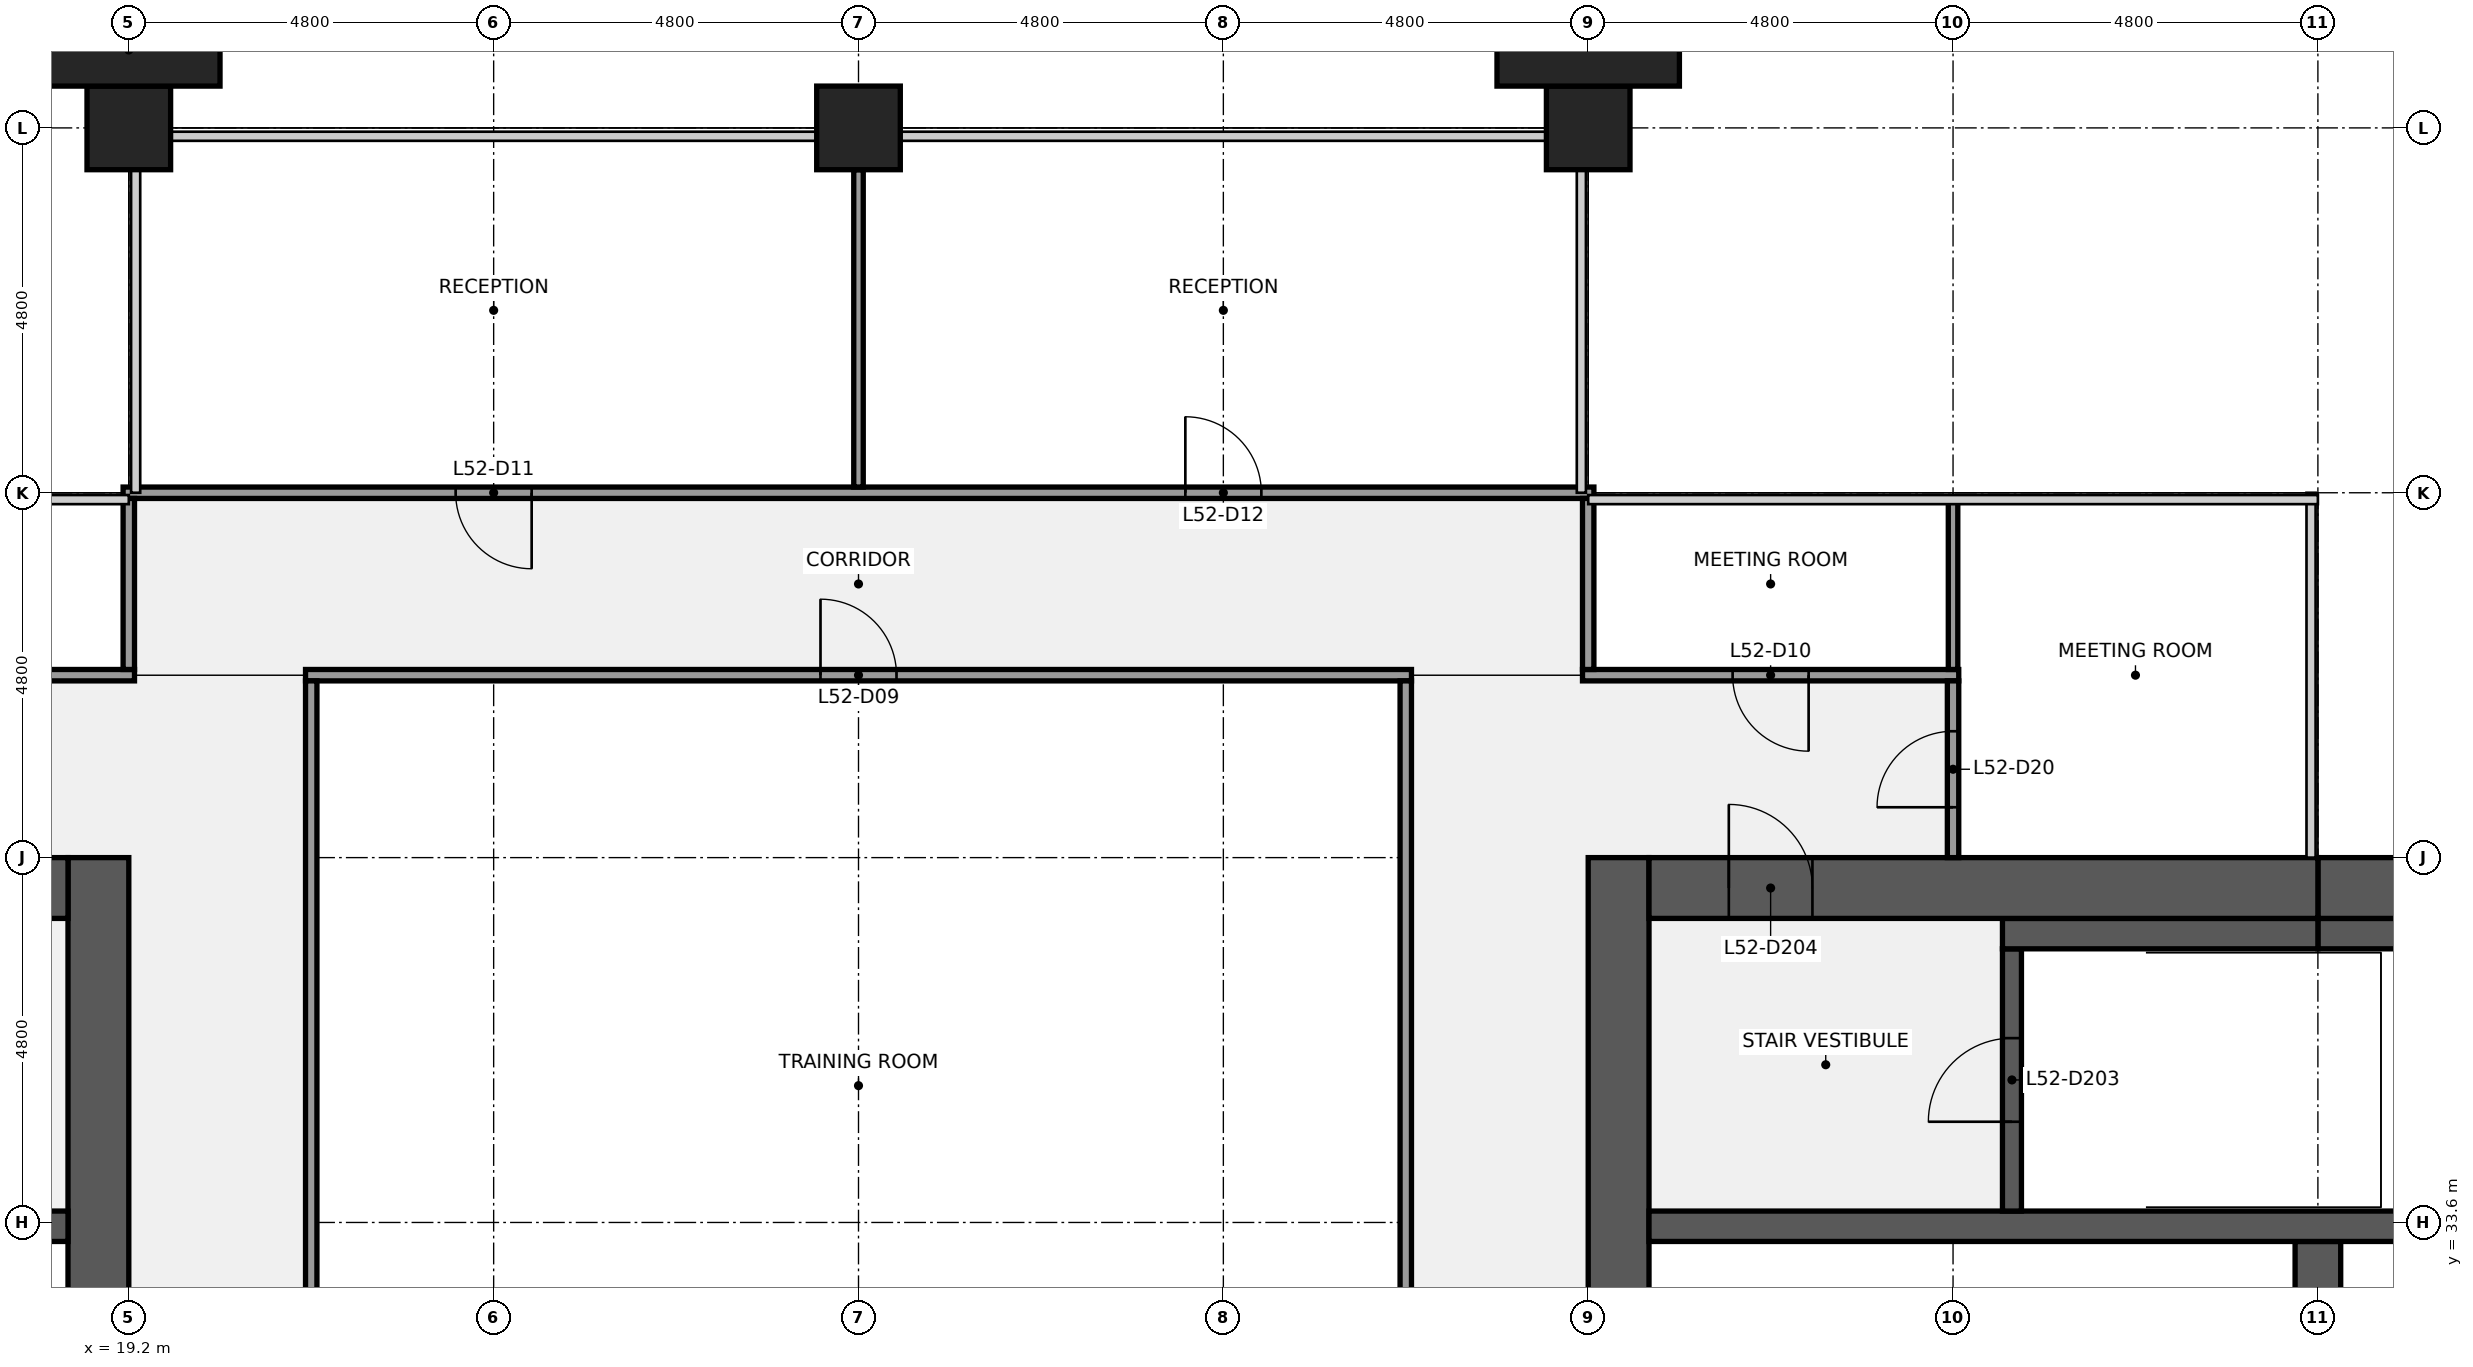
"""IFC4 building model, lengths in metres.
Left out: names, types, materials, properties, quantities, classifications, styles, units other than length and angle.
Written with IfcOpenShell. Run it as: python <this file> out.ifc"""

import sys

from ifc_helpers import new_model, si_unit, direction, frame, frame_2d, origin, origin_2d, place, context, subcontext, project, spatial, rectangle, extrude, element, fill, save


model = new_model("IFC4")
c1 = context("Model", 3, precision=1e-05, world=origin(), true_north=direction((0.0, 1.0)))
c2 = subcontext(c1, "Body", "Model", "MODEL_VIEW")
j1 = project(units=[si_unit("LENGTHUNIT", "METRE"), si_unit("PLANEANGLEUNIT", "RADIAN")], contexts=[c1])
p1 = place(None, origin())
s1 = spatial("IfcSite", under=j1, at=p1, CompositionType="ELEMENT")
p2 = place(p1, origin())
s2 = spatial("IfcBuilding", under=s1, at=p2, CompositionType="ELEMENT")
p3 = place(p2, frame((0.0, 0.0, 237.2)))
s3 = spatial("IfcBuildingStorey", under=s2, at=p3, CompositionType="ELEMENT", Elevation=237.2)
for number, where, z_axis, x_axis in (
    (1, (19.2, 48.0, 0.0), (0.0, 0.0, 1.0), (1.0, 0.0, 0.0)),
    (2, (28.8, 48.0, 0.0), (0.0, 0.0, 1.0), (1.0, 0.0, 0.0)),
    (3, (38.4, 48.0, 0.0), (0.0, 0.0, 1.0), (1.0, 0.0, 0.0)),
):
    element("IfcColumn", number, at=place(p3, frame(where, z_axis=z_axis, x_axis=x_axis)), inside=s3, PredefinedType="COLUMN", context=c2, shape_type="SweptSolid", body=[
        extrude(rectangle(XDim=1.1, YDim=1.1, at=origin_2d()), origin(), (0.0, 0.0, 1.0), 4.0),
    ])
p4 = place(p3, frame((18.8, 38.4, 0.0), z_axis=(0.0, 0.0, 1.0), x_axis=(0.0, -1.0, 0.0)))
e4 = element("IfcWall", 4, at=p4, inside=s3, PredefinedType="SHEAR", context=c2, shape_type="SweptSolid", body=[
    extrude(rectangle(XDim=28.8, YDim=0.8, at=frame_2d((14.4, 0.0))), origin(), (0.0, 0.0, 1.0), 3.84),
])
p5 = place(p4, frame((18.3, 0.0, 0.0)))
e5 = element("IfcOpeningElement", 5, at=p5, cuts=e4, PredefinedType="OPENING", context=c2, shape_type="SweptSolid", body=[
    extrude(rectangle(XDim=1.8, YDim=2.1, at=frame_2d((0.9, 1.05))), frame((0.0, 0.41, 0.0), z_axis=(0.0, -1.0, 0.0), x_axis=(1.0, 0.0, 0.0)), (0.0, 0.0, 1.0), 0.82),
])
p6 = place(p4, frame((8.7, 0.0, 0.0)))
e6 = element("IfcOpeningElement", 6, at=p6, cuts=e4, PredefinedType="OPENING", context=c2, shape_type="SweptSolid", body=[
    extrude(rectangle(XDim=1.8, YDim=2.1, at=frame_2d((0.9, 1.05))), frame((0.0, 0.41, 0.0), z_axis=(0.0, -1.0, 0.0), x_axis=(1.0, 0.0, 0.0)), (0.0, 0.0, 1.0), 0.82),
])
p7 = place(p3, frame((0.8, 33.55, 0.0), z_axis=(0.0, 0.0, 1.0), x_axis=(1.0, 0.0, 0.0)))
e7 = element("IfcWall", 7, at=p7, inside=s3, PredefinedType="SHEAR", context=c2, shape_type="SweptSolid", body=[
    extrude(rectangle(XDim=17.6, YDim=0.4, at=frame_2d((8.8, 0.0))), origin(), (0.0, 0.0, 1.0), 3.84),
])
p8 = place(p3, frame((9.6, 38.0, 0.0), z_axis=(0.0, 0.0, 1.0), x_axis=(1.0, 0.0, 0.0)))
e8 = element("IfcWall", 8, at=p8, inside=s3, PredefinedType="SHEAR", context=c2, shape_type="SweptSolid", body=[
    extrude(rectangle(XDim=8.8, YDim=0.8, at=frame_2d((4.4, 0.0))), origin(), (0.0, 0.0, 1.0), 3.84),
])
p9 = place(p8, frame((6.65, 0.0, 0.0)))
e9 = element("IfcOpeningElement", 9, at=p9, cuts=e8, PredefinedType="OPENING", context=c2, shape_type="SweptSolid", body=[
    extrude(rectangle(XDim=1.1, YDim=2.1, at=frame_2d((0.55, 1.05))), frame((0.0, 0.41, 0.0), z_axis=(0.0, -1.0, 0.0), x_axis=(1.0, 0.0, 0.0)), (0.0, 0.0, 1.0), 0.82),
])
p10 = place(p3, frame((38.8, 9.6, 0.0), z_axis=(0.0, 0.0, 1.0), x_axis=(0.0, 1.0, 0.0)))
e10 = element("IfcWall", 10, at=p10, inside=s3, PredefinedType="SHEAR", context=c2, shape_type="SweptSolid", body=[
    extrude(rectangle(XDim=28.8, YDim=0.8, at=frame_2d((14.4, 0.0))), origin(), (0.0, 0.0, 1.0), 3.84),
])
p11 = place(p10, frame((8.7, 0.0, 0.0)))
e11 = element("IfcOpeningElement", 11, at=p11, cuts=e10, PredefinedType="OPENING", context=c2, shape_type="SweptSolid", body=[
    extrude(rectangle(XDim=1.8, YDim=2.1, at=frame_2d((0.9, 1.05))), frame((0.0, 0.41, 0.0), z_axis=(0.0, -1.0, 0.0), x_axis=(1.0, 0.0, 0.0)), (0.0, 0.0, 1.0), 0.82),
])
p12 = place(p10, frame((18.3, 0.0, 0.0)))
e12 = element("IfcOpeningElement", 12, at=p12, cuts=e10, PredefinedType="OPENING", context=c2, shape_type="SweptSolid", body=[
    extrude(rectangle(XDim=1.8, YDim=2.1, at=frame_2d((0.9, 1.05))), frame((0.0, 0.41, 0.0), z_axis=(0.0, -1.0, 0.0), x_axis=(1.0, 0.0, 0.0)), (0.0, 0.0, 1.0), 0.82),
])
p13 = place(p3, frame((48.0, 30.75, 0.0), z_axis=(0.0, 0.0, 1.0), x_axis=(0.0, 1.0, 0.0)))
e13 = element("IfcWall", 13, at=p13, inside=s3, PredefinedType="SHEAR", context=c2, shape_type="SweptSolid", body=[
    extrude(rectangle(XDim=2.6, YDim=0.6, at=frame_2d((1.3, 0.0))), origin(), (0.0, 0.0, 1.0), 3.84),
])
p14 = place(p3, frame((39.2, 33.55, 0.0), z_axis=(0.0, 0.0, 1.0), x_axis=(1.0, 0.0, 0.0)))
e14 = element("IfcWall", 14, at=p14, inside=s3, PredefinedType="SHEAR", context=c2, shape_type="SweptSolid", body=[
    extrude(rectangle(XDim=17.6, YDim=0.4, at=frame_2d((8.8, 0.0))), origin(), (0.0, 0.0, 1.0), 3.84),
])
p15 = place(p3, frame((43.975, 33.75, 0.0), z_axis=(0.0, 0.0, 1.0), x_axis=(0.0, 1.0, 0.0)))
e15 = element("IfcWall", 15, at=p15, inside=s3, PredefinedType="SHEAR", context=c2, shape_type="SweptSolid", body=[
    extrude(rectangle(XDim=3.45, YDim=0.25, at=frame_2d((1.725, 0.0))), origin(), (0.0, 0.0, 1.0), 3.84),
])
p16 = place(p15, frame((1.175, 0.0, 0.0)))
e16 = element("IfcOpeningElement", 16, at=p16, cuts=e15, PredefinedType="OPENING", context=c2, shape_type="SweptSolid", body=[
    extrude(rectangle(XDim=1.1, YDim=2.1, at=frame_2d((0.55, 1.05))), frame((0.0, 0.135, 0.0), z_axis=(0.0, -1.0, 0.0), x_axis=(1.0, 0.0, 0.0)), (0.0, 0.0, 1.0), 0.27),
])
p17 = place(p3, frame((48.0, 37.4, 0.0), z_axis=(0.0, 0.0, 1.0), x_axis=(1.0, 0.0, 0.0)))
e17 = element("IfcWall", 17, at=p17, inside=s3, PredefinedType="SHEAR", context=c2, shape_type="SweptSolid", body=[
    extrude(rectangle(XDim=3.35, YDim=0.4, at=frame_2d((1.675, 0.0))), origin(), (0.0, 0.0, 1.0), 3.84),
])
p18 = place(p3, frame((43.85, 37.4, 0.0), z_axis=(0.0, 0.0, 1.0), x_axis=(1.0, 0.0, 0.0)))
e18 = element("IfcWall", 18, at=p18, inside=s3, PredefinedType="SHEAR", context=c2, shape_type="SweptSolid", body=[
    extrude(rectangle(XDim=4.15, YDim=0.4, at=frame_2d((2.075, 0.0))), origin(), (0.0, 0.0, 1.0), 3.84),
])
p19 = place(p3, frame((48.0, 38.0, 0.0), z_axis=(0.0, 0.0, 1.0), x_axis=(1.0, 0.0, 0.0)))
e19 = element("IfcWall", 19, at=p19, inside=s3, PredefinedType="SHEAR", context=c2, shape_type="SweptSolid", body=[
    extrude(rectangle(XDim=8.8, YDim=0.8, at=frame_2d((4.4, 0.0))), origin(), (0.0, 0.0, 1.0), 3.84),
])
p20 = place(p19, frame((1.5, 0.0, 0.9)))
e20 = element("IfcOpeningElement", 20, at=p20, cuts=e19, PredefinedType="OPENING", context=c2, shape_type="SweptSolid", body=[
    extrude(rectangle(XDim=1.8, YDim=1.5, at=frame_2d((0.9, 0.75))), frame((0.0, 0.41, 0.0), z_axis=(0.0, -1.0, 0.0), x_axis=(1.0, 0.0, 0.0)), (0.0, 0.0, 1.0), 0.82),
])
p21 = place(p3, frame((39.2, 38.0, 0.0), z_axis=(0.0, 0.0, 1.0), x_axis=(1.0, 0.0, 0.0)))
e21 = element("IfcWall", 21, at=p21, inside=s3, PredefinedType="SHEAR", context=c2, shape_type="SweptSolid", body=[
    extrude(rectangle(XDim=8.8, YDim=0.8, at=frame_2d((4.4, 0.0))), origin(), (0.0, 0.0, 1.0), 3.84),
])
p22 = place(p21, frame((1.05, 0.0, 0.0)))
e22 = element("IfcOpeningElement", 22, at=p22, cuts=e21, PredefinedType="OPENING", context=c2, shape_type="SweptSolid", body=[
    extrude(rectangle(XDim=1.1, YDim=2.1, at=frame_2d((0.55, 1.05))), frame((0.0, 0.41, 0.0), z_axis=(0.0, -1.0, 0.0), x_axis=(1.0, 0.0, 0.0)), (0.0, 0.0, 1.0), 0.82),
])
p23 = place(p3, frame((14.325, 40.8, 0.0), z_axis=(0.0, 0.0, 1.0), x_axis=(1.0, 0.0, 0.0)))
e23 = element("IfcWall", 23, at=p23, inside=s3, PredefinedType="PARTITIONING", context=c2, shape_type="SweptSolid", body=[
    extrude(rectangle(XDim=4.95, YDim=0.15, at=frame_2d((2.475, 0.0))), origin(), (0.0, 0.0, 1.0), 2.87),
])
p24 = place(p23, frame((1.975, 0.0, 0.0)))
e24 = element("IfcOpeningElement", 24, at=p24, cuts=e23, PredefinedType="OPENING", context=c2, shape_type="SweptSolid", body=[
    extrude(rectangle(XDim=1.0, YDim=2.1, at=frame_2d((0.5, 1.05))), frame((0.0, 0.085, 0.0), z_axis=(0.0, -1.0, 0.0), x_axis=(1.0, 0.0, 0.0)), (0.0, 0.0, 1.0), 0.17),
])
p25 = place(p3, frame((21.525, 40.8, 0.0), z_axis=(0.0, 0.0, 1.0), x_axis=(1.0, 0.0, 0.0)))
e25 = element("IfcWall", 25, at=p25, inside=s3, PredefinedType="PARTITIONING", context=c2, shape_type="SweptSolid", body=[
    extrude(rectangle(XDim=14.55, YDim=0.15, at=frame_2d((7.275, 0.0))), origin(), (0.0, 0.0, 1.0), 2.87),
])
p26 = place(p25, frame((6.775, 0.0, 0.0)))
e26 = element("IfcOpeningElement", 26, at=p26, cuts=e25, PredefinedType="OPENING", context=c2, shape_type="SweptSolid", body=[
    extrude(rectangle(XDim=1.0, YDim=2.1, at=frame_2d((0.5, 1.05))), frame((0.0, 0.085, 0.0), z_axis=(0.0, -1.0, 0.0), x_axis=(1.0, 0.0, 0.0)), (0.0, 0.0, 1.0), 0.17),
])
p27 = place(p3, frame((38.325, 40.8, 0.0), z_axis=(0.0, 0.0, 1.0), x_axis=(1.0, 0.0, 0.0)))
e27 = element("IfcWall", 27, at=p27, inside=s3, PredefinedType="PARTITIONING", context=c2, shape_type="SweptSolid", body=[
    extrude(rectangle(XDim=4.95, YDim=0.15, at=frame_2d((2.475, 0.0))), origin(), (0.0, 0.0, 1.0), 2.87),
])
p28 = place(p27, frame((1.975, 0.0, 0.0)))
e28 = element("IfcOpeningElement", 28, at=p28, cuts=e27, PredefinedType="OPENING", context=c2, shape_type="SweptSolid", body=[
    extrude(rectangle(XDim=1.0, YDim=2.1, at=frame_2d((0.5, 1.05))), frame((0.0, 0.085, 0.0), z_axis=(0.0, -1.0, 0.0), x_axis=(1.0, 0.0, 0.0)), (0.0, 0.0, 1.0), 0.17),
])
p29 = place(p3, frame((19.125, 43.2, 0.0), z_axis=(0.0, 0.0, 1.0), x_axis=(1.0, 0.0, 0.0)))
e29 = element("IfcWall", 29, at=p29, inside=s3, PredefinedType="PARTITIONING", context=c2, shape_type="SweptSolid", body=[
    extrude(rectangle(XDim=19.35, YDim=0.15, at=frame_2d((9.675, 0.0))), origin(), (0.0, 0.0, 1.0), 2.87),
])
p30 = place(p29, frame((4.375, 0.0, 0.0)))
e30 = element("IfcOpeningElement", 30, at=p30, cuts=e29, PredefinedType="OPENING", context=c2, shape_type="SweptSolid", body=[
    extrude(rectangle(XDim=1.0, YDim=2.1, at=frame_2d((0.5, 1.05))), frame((0.0, 0.085, 0.0), z_axis=(0.0, -1.0, 0.0), x_axis=(1.0, 0.0, 0.0)), (0.0, 0.0, 1.0), 0.17),
])
p31 = place(p29, frame((13.975, 0.0, 0.0)))
e31 = element("IfcOpeningElement", 31, at=p31, cuts=e29, PredefinedType="OPENING", context=c2, shape_type="SweptSolid", body=[
    extrude(rectangle(XDim=1.0, YDim=2.1, at=frame_2d((0.5, 1.05))), frame((0.0, 0.085, 0.0), z_axis=(0.0, -1.0, 0.0), x_axis=(1.0, 0.0, 0.0)), (0.0, 0.0, 1.0), 0.17),
])
p32 = place(p3, frame((19.2, 40.875, 0.0), z_axis=(0.0, 0.0, 1.0), x_axis=(0.0, 1.0, 0.0)))
e32 = element("IfcWall", 32, at=p32, inside=s3, PredefinedType="PARTITIONING", context=c2, shape_type="SweptSolid", body=[
    extrude(rectangle(XDim=2.25, YDim=0.15, at=frame_2d((1.125, 0.0))), origin(), (0.0, 0.0, 1.0), 2.87),
])
p33 = place(p3, frame((21.6, 30.062, 0.0), z_axis=(0.0, 0.0, 1.0), x_axis=(0.0, 1.0, 0.0)))
e33 = element("IfcWall", 33, at=p33, inside=s3, PredefinedType="PARTITIONING", context=c2, shape_type="SweptSolid", body=[
    extrude(rectangle(XDim=10.663, YDim=0.15, at=frame_2d((5.331, 0.0))), origin(), (0.0, 0.0, 1.0), 2.87),
])
p34 = place(p3, frame((28.8, 43.275, 0.0), z_axis=(0.0, 0.0, 1.0), x_axis=(0.0, 1.0, 0.0)))
e34 = element("IfcWall", 34, at=p34, inside=s3, PredefinedType="PARTITIONING", context=c2, shape_type="SweptSolid", body=[
    extrude(rectangle(XDim=4.175, YDim=0.125, at=frame_2d((2.087, 0.0))), origin(), (0.0, 0.0, 1.0), 2.87),
])
p35 = place(p3, frame((36.0, 30.062, 0.0), z_axis=(0.0, 0.0, 1.0), x_axis=(0.0, 1.0, 0.0)))
e35 = element("IfcWall", 35, at=p35, inside=s3, PredefinedType="PARTITIONING", context=c2, shape_type="SweptSolid", body=[
    extrude(rectangle(XDim=10.663, YDim=0.15, at=frame_2d((5.331, 0.0))), origin(), (0.0, 0.0, 1.0), 2.87),
])
p36 = place(p3, frame((38.4, 40.875, 0.0), z_axis=(0.0, 0.0, 1.0), x_axis=(0.0, 1.0, 0.0)))
e36 = element("IfcWall", 36, at=p36, inside=s3, PredefinedType="PARTITIONING", context=c2, shape_type="SweptSolid", body=[
    extrude(rectangle(XDim=2.25, YDim=0.15, at=frame_2d((1.125, 0.0))), origin(), (0.0, 0.0, 1.0), 2.87),
])
p37 = place(p3, frame((43.2, 40.875, 0.0), z_axis=(0.0, 0.0, 1.0), x_axis=(0.0, 1.0, 0.0)))
e37 = element("IfcWall", 37, at=p37, inside=s3, PredefinedType="PARTITIONING", context=c2, shape_type="SweptSolid", body=[
    extrude(rectangle(XDim=2.225, YDim=0.125, at=frame_2d((1.113, 0.0))), origin(), (0.0, 0.0, 1.0), 2.87),
])
p38 = place(p3, frame((43.2, 38.4, 0.0), z_axis=(0.0, 0.0, 1.0), x_axis=(0.0, 1.0, 0.0)))
e38 = element("IfcWall", 38, at=p38, inside=s3, PredefinedType="PARTITIONING", context=c2, shape_type="SweptSolid", body=[
    extrude(rectangle(XDim=2.325, YDim=0.15, at=frame_2d((1.163, 0.0))), origin(), (0.0, 0.0, 1.0), 2.87),
])
p39 = place(p38, frame((0.663, 0.0, 0.0)))
e39 = element("IfcOpeningElement", 39, at=p39, cuts=e38, PredefinedType="OPENING", context=c2, shape_type="SweptSolid", body=[
    extrude(rectangle(XDim=1.0, YDim=2.1, at=frame_2d((0.5, 1.05))), frame((0.0, 0.085, 0.0), z_axis=(0.0, -1.0, 0.0), x_axis=(1.0, 0.0, 0.0)), (0.0, 0.0, 1.0), 0.17),
])
for number, where, z_axis, x_axis in (
    (40, (19.2, 49.025, 0.0), (0.0, 0.0, 1.0), (1.0, 0.0, 0.0)),
    (41, (38.4, 49.025, 0.0), (0.0, 0.0, 1.0), (1.0, 0.0, 0.0)),
):
    element("IfcColumn", number, at=place(p3, frame(where, z_axis=z_axis, x_axis=x_axis)), inside=s3, PredefinedType="PILASTER", context=c2, shape_type="SweptSolid", body=[
        extrude(rectangle(XDim=2.4, YDim=0.95, at=origin_2d()), origin(), (0.0, 0.0, 1.0), 4.0),
    ])
p40 = place(p16, origin())
e42 = element("IfcDoor", 42, at=p40, inside=s3, OperationType="SINGLE_SWING_LEFT", PredefinedType="DOOR", context=c2, shape_type="SweptSolid", body=[
    extrude(rectangle(XDim=1.1, YDim=2.1, at=frame_2d((0.55, 1.05))), frame((0.0, 0.025, 0.0), z_axis=(0.0, -1.0, 0.0), x_axis=(1.0, 0.0, 0.0)), (0.0, 0.0, 1.0), 0.05),
])
fill(e16, e42)
p41 = place(p22, origin())
e43 = element("IfcDoor", 43, at=p41, inside=s3, OperationType="SINGLE_SWING_LEFT", PredefinedType="DOOR", context=c2, shape_type="SweptSolid", body=[
    extrude(rectangle(XDim=1.1, YDim=2.1, at=frame_2d((0.55, 1.05))), frame((0.0, 0.025, 0.0), z_axis=(0.0, -1.0, 0.0), x_axis=(1.0, 0.0, 0.0)), (0.0, 0.0, 1.0), 0.05),
])
fill(e22, e43)
p42 = place(p26, origin())
e44 = element("IfcDoor", 44, at=p42, inside=s3, OperationType="SINGLE_SWING_LEFT", PredefinedType="DOOR", context=c2, shape_type="SweptSolid", body=[
    extrude(rectangle(XDim=1.0, YDim=2.1, at=frame_2d((0.5, 1.05))), frame((0.0, 0.025, 0.0), z_axis=(0.0, -1.0, 0.0), x_axis=(1.0, 0.0, 0.0)), (0.0, 0.0, 1.0), 0.05),
])
fill(e26, e44)
p43 = place(p28, origin())
e45 = element("IfcDoor", 45, at=p43, inside=s3, OperationType="SINGLE_SWING_RIGHT", PredefinedType="DOOR", context=c2, shape_type="SweptSolid", body=[
    extrude(rectangle(XDim=1.0, YDim=2.1, at=frame_2d((0.5, 1.05))), frame((0.0, 0.025, 0.0), z_axis=(0.0, -1.0, 0.0), x_axis=(1.0, 0.0, 0.0)), (0.0, 0.0, 1.0), 0.05),
])
fill(e28, e45)
p44 = place(p30, origin())
e46 = element("IfcDoor", 46, at=p44, inside=s3, OperationType="SINGLE_SWING_RIGHT", PredefinedType="DOOR", context=c2, shape_type="SweptSolid", body=[
    extrude(rectangle(XDim=1.0, YDim=2.1, at=frame_2d((0.5, 1.05))), frame((0.0, 0.025, 0.0), z_axis=(0.0, -1.0, 0.0), x_axis=(1.0, 0.0, 0.0)), (0.0, 0.0, 1.0), 0.05),
])
fill(e30, e46)
p45 = place(p31, origin())
e47 = element("IfcDoor", 47, at=p45, inside=s3, OperationType="SINGLE_SWING_LEFT", PredefinedType="DOOR", context=c2, shape_type="SweptSolid", body=[
    extrude(rectangle(XDim=1.0, YDim=2.1, at=frame_2d((0.5, 1.05))), frame((0.0, 0.025, 0.0), z_axis=(0.0, -1.0, 0.0), x_axis=(1.0, 0.0, 0.0)), (0.0, 0.0, 1.0), 0.05),
])
fill(e31, e47)
p46 = place(p39, origin())
e48 = element("IfcDoor", 48, at=p46, inside=s3, OperationType="SINGLE_SWING_LEFT", PredefinedType="DOOR", context=c2, shape_type="SweptSolid", body=[
    extrude(rectangle(XDim=1.0, YDim=2.1, at=frame_2d((0.5, 1.05))), frame((0.0, 0.025, 0.0), z_axis=(0.0, -1.0, 0.0), x_axis=(1.0, 0.0, 0.0)), (0.0, 0.0, 1.0), 0.05),
])
fill(e39, e48)
save(model, sys.argv[1])
